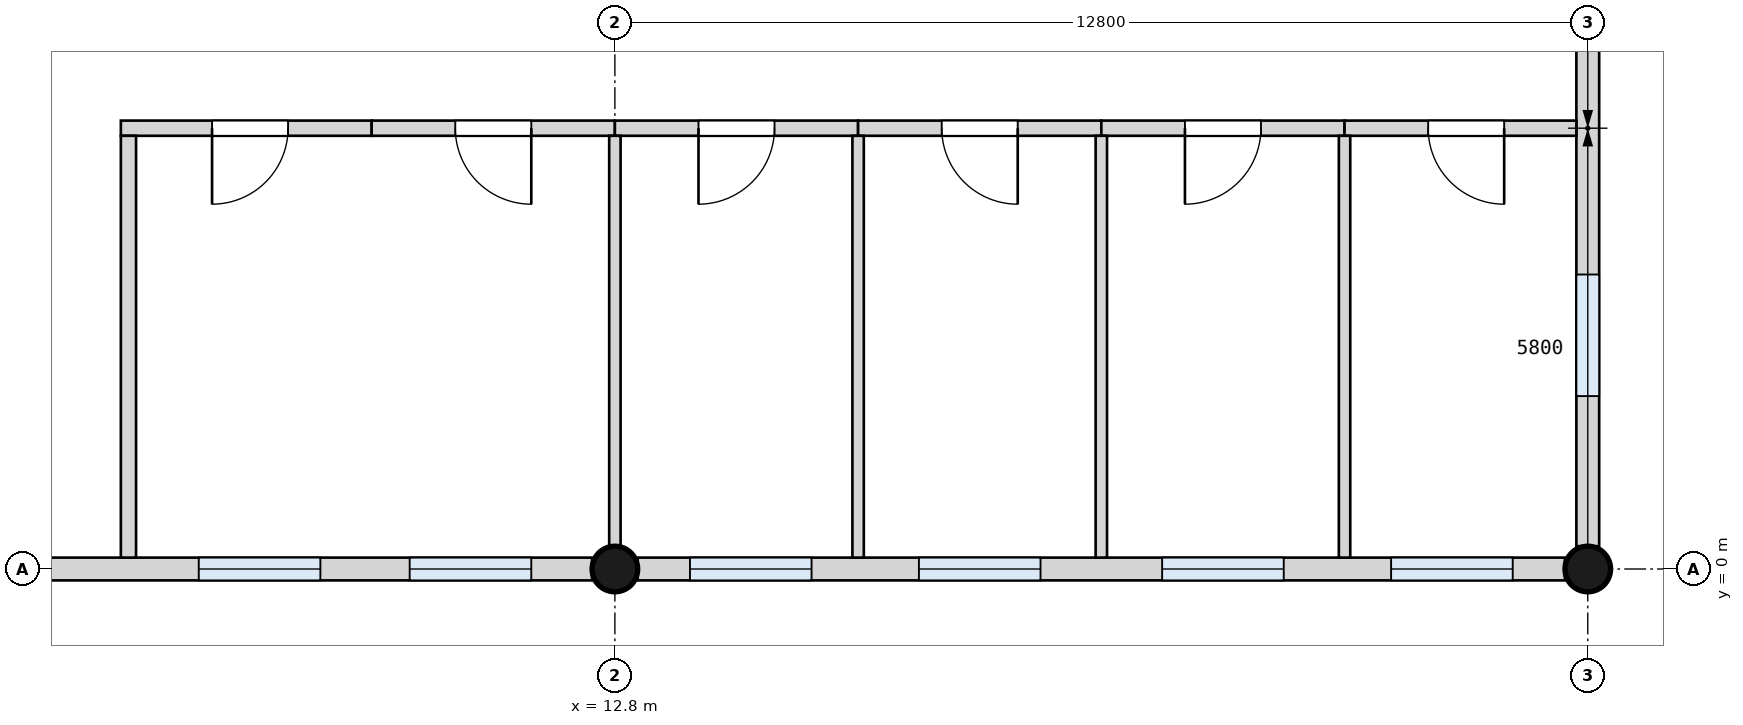
"""IFC4 building model, lengths in metres.
Left out: names, types, materials, properties, quantities, classifications, styles, units other than length and angle.
Written with IfcOpenShell. Run it as: python <this file> out.ifc"""

import sys

from ifc_helpers import new_model, si_unit, direction, frame, frame_2d, origin, origin_2d, place, context, subcontext, project, spatial, rectangle, circle, extrude, element, fill, save


model = new_model("IFC4")
c1 = context("Model", 3, precision=1e-05, world=origin(), true_north=direction((0.0, 1.0)))
c2 = subcontext(c1, "Body", "Model", "MODEL_VIEW")
j1 = project(units=[si_unit("LENGTHUNIT", "METRE"), si_unit("PLANEANGLEUNIT", "RADIAN")], contexts=[c1])
p1 = place(None, origin())
s1 = spatial("IfcSite", under=j1, at=p1, CompositionType="ELEMENT")
p2 = place(p1, origin())
s2 = spatial("IfcBuilding", under=s1, at=p2, CompositionType="ELEMENT")
p3 = place(p2, frame((0.0, 0.0, 4.2)))
s3 = spatial("IfcBuildingStorey", under=s2, at=p3, CompositionType="ELEMENT", Elevation=4.2)
for number, where, z_axis, x_axis in (
    (1, (12.8, 0.0, 0.0), (0.0, 0.0, 1.0), (1.0, 0.0, 0.0)),
    (2, (25.6, 0.0, 0.0), (0.0, 0.0, 1.0), (1.0, 0.0, 0.0)),
):
    element("IfcColumn", number, at=place(p3, frame(where, z_axis=z_axis, x_axis=x_axis)), inside=s3, PredefinedType="COLUMN", context=c2, shape_type="SweptSolid", body=[
        extrude(circle(Radius=0.3, at=origin_2d()), origin(), (0.0, 0.0, 1.0), 4.2),
    ])
p4 = place(p3, frame((4.6, 0.0, 0.0), z_axis=(0.0, 0.0, 1.0), x_axis=(1.0, 0.0, 0.0)))
e3 = element("IfcWall", 3, at=p4, inside=s3, PredefinedType="SOLIDWALL", context=c2, shape_type="SweptSolid", body=[
    extrude(rectangle(XDim=7.9, YDim=0.3, at=frame_2d((3.95, 0.0))), origin(), (0.0, 0.0, 1.0), 3.0),
])
p5 = place(p4, frame((2.725, 0.0, 1.0)))
e4 = element("IfcOpeningElement", 4, at=p5, cuts=e3, PredefinedType="OPENING", context=c2, shape_type="SweptSolid", body=[
    extrude(rectangle(XDim=1.6, YDim=1.8, at=frame_2d((0.8, 0.9))), frame((0.0, 0.16, 0.0), z_axis=(0.0, -1.0, 0.0), x_axis=(1.0, 0.0, 0.0)), (0.0, 0.0, 1.0), 0.32),
])
p6 = place(p4, frame((5.5, 0.0, 1.0)))
e5 = element("IfcOpeningElement", 5, at=p6, cuts=e3, PredefinedType="OPENING", context=c2, shape_type="SweptSolid", body=[
    extrude(rectangle(XDim=1.6, YDim=1.8, at=frame_2d((0.8, 0.9))), frame((0.0, 0.16, 0.0), z_axis=(0.0, -1.0, 0.0), x_axis=(1.0, 0.0, 0.0)), (0.0, 0.0, 1.0), 0.32),
])
p7 = place(p3, frame((13.1, 0.0, 0.0), z_axis=(0.0, 0.0, 1.0), x_axis=(1.0, 0.0, 0.0)))
e6 = element("IfcWall", 6, at=p7, inside=s3, PredefinedType="SOLIDWALL", context=c2, shape_type="SweptSolid", body=[
    extrude(rectangle(XDim=12.2, YDim=0.3, at=frame_2d((6.1, 0.0))), origin(), (0.0, 0.0, 1.0), 3.0),
])
p8 = place(p7, frame((0.688, 0.0, 1.0)))
e7 = element("IfcOpeningElement", 7, at=p8, cuts=e6, PredefinedType="OPENING", context=c2, shape_type="SweptSolid", body=[
    extrude(rectangle(XDim=1.6, YDim=1.8, at=frame_2d((0.8, 0.9))), frame((0.0, 0.16, 0.0), z_axis=(0.0, -1.0, 0.0), x_axis=(1.0, 0.0, 0.0)), (0.0, 0.0, 1.0), 0.32),
])
p9 = place(p7, frame((3.7, 0.0, 1.0)))
e8 = element("IfcOpeningElement", 8, at=p9, cuts=e6, PredefinedType="OPENING", context=c2, shape_type="SweptSolid", body=[
    extrude(rectangle(XDim=1.6, YDim=1.8, at=frame_2d((0.8, 0.9))), frame((0.0, 0.16, 0.0), z_axis=(0.0, -1.0, 0.0), x_axis=(1.0, 0.0, 0.0)), (0.0, 0.0, 1.0), 0.32),
])
p10 = place(p7, frame((6.9, 0.0, 1.0)))
e9 = element("IfcOpeningElement", 9, at=p10, cuts=e6, PredefinedType="OPENING", context=c2, shape_type="SweptSolid", body=[
    extrude(rectangle(XDim=1.6, YDim=1.8, at=frame_2d((0.8, 0.9))), frame((0.0, 0.16, 0.0), z_axis=(0.0, -1.0, 0.0), x_axis=(1.0, 0.0, 0.0)), (0.0, 0.0, 1.0), 0.32),
])
p11 = place(p7, frame((9.913, 0.0, 1.0)))
e10 = element("IfcOpeningElement", 10, at=p11, cuts=e6, PredefinedType="OPENING", context=c2, shape_type="SweptSolid", body=[
    extrude(rectangle(XDim=1.6, YDim=1.8, at=frame_2d((0.8, 0.9))), frame((0.0, 0.16, 0.0), z_axis=(0.0, -1.0, 0.0), x_axis=(1.0, 0.0, 0.0)), (0.0, 0.0, 1.0), 0.32),
])
p12 = place(p3, frame((25.6, 0.3, 0.0), z_axis=(0.0, 0.0, 1.0), x_axis=(0.0, 1.0, 0.0)))
e11 = element("IfcWall", 11, at=p12, inside=s3, PredefinedType="SOLIDWALL", context=c2, shape_type="SweptSolid", body=[
    extrude(rectangle(XDim=13.8, YDim=0.3, at=frame_2d((6.9, 0.0))), origin(), (0.0, 0.0, 1.0), 2.9),
])
p13 = place(p12, frame((1.975, 0.0, 1.0)))
e12 = element("IfcOpeningElement", 12, at=p13, cuts=e11, PredefinedType="OPENING", context=c2, shape_type="SweptSolid", body=[
    extrude(rectangle(XDim=1.6, YDim=1.8, at=frame_2d((0.8, 0.9))), frame((0.0, 0.16, 0.0), z_axis=(0.0, -1.0, 0.0), x_axis=(1.0, 0.0, 0.0)), (0.0, 0.0, 1.0), 0.32),
])
p14 = place(p12, frame((8.812, 0.0, 1.0)))
e13 = element("IfcOpeningElement", 13, at=p14, cuts=e11, PredefinedType="OPENING", context=c2, shape_type="SweptSolid", body=[
    extrude(rectangle(XDim=1.6, YDim=1.8, at=frame_2d((0.8, 0.9))), frame((0.0, 0.16, 0.0), z_axis=(0.0, -1.0, 0.0), x_axis=(1.0, 0.0, 0.0)), (0.0, 0.0, 1.0), 0.32),
])
p15 = place(p12, frame((11.712, 0.0, 1.0)))
e14 = element("IfcOpeningElement", 14, at=p15, cuts=e11, PredefinedType="OPENING", context=c2, shape_type="SweptSolid", body=[
    extrude(rectangle(XDim=1.6, YDim=1.8, at=frame_2d((0.8, 0.9))), frame((0.0, 0.16, 0.0), z_axis=(0.0, -1.0, 0.0), x_axis=(1.0, 0.0, 0.0)), (0.0, 0.0, 1.0), 0.32),
])
p16 = place(p3, frame((6.3, 5.8, 0.0), z_axis=(0.0, 0.0, 1.0), x_axis=(1.0, 0.0, 0.0)))
e15 = element("IfcWall", 15, at=p16, inside=s3, PredefinedType="PARTITIONING", context=c2, shape_type="SweptSolid", body=[
    extrude(rectangle(XDim=3.3, YDim=0.2, at=frame_2d((1.65, 0.0))), origin(), (0.0, 0.0, 1.0), 3.9),
])
p17 = place(p16, frame((1.2, 0.0, 0.0)))
e16 = element("IfcOpeningElement", 16, at=p17, cuts=e15, PredefinedType="OPENING", context=c2, shape_type="SweptSolid", body=[
    extrude(rectangle(XDim=1.0, YDim=2.1, at=frame_2d((0.5, 1.05))), frame((0.0, 0.11, 0.0), z_axis=(0.0, -1.0, 0.0), x_axis=(1.0, 0.0, 0.0)), (0.0, 0.0, 1.0), 0.22),
])
p18 = place(p3, frame((9.6, 5.8, 0.0), z_axis=(0.0, 0.0, 1.0), x_axis=(1.0, 0.0, 0.0)))
e17 = element("IfcWall", 17, at=p18, inside=s3, PredefinedType="PARTITIONING", context=c2, shape_type="SweptSolid", body=[
    extrude(rectangle(XDim=3.2, YDim=0.2, at=frame_2d((1.6, 0.0))), origin(), (0.0, 0.0, 1.0), 3.9),
])
p19 = place(p18, frame((1.1, 0.0, 0.0)))
e18 = element("IfcOpeningElement", 18, at=p19, cuts=e17, PredefinedType="OPENING", context=c2, shape_type="SweptSolid", body=[
    extrude(rectangle(XDim=1.0, YDim=2.1, at=frame_2d((0.5, 1.05))), frame((0.0, 0.11, 0.0), z_axis=(0.0, -1.0, 0.0), x_axis=(1.0, 0.0, 0.0)), (0.0, 0.0, 1.0), 0.22),
])
p20 = place(p3, frame((12.8, 5.8, 0.0), z_axis=(0.0, 0.0, 1.0), x_axis=(1.0, 0.0, 0.0)))
e19 = element("IfcWall", 19, at=p20, inside=s3, PredefinedType="PARTITIONING", context=c2, shape_type="SweptSolid", body=[
    extrude(rectangle(XDim=3.2, YDim=0.2, at=frame_2d((1.6, 0.0))), origin(), (0.0, 0.0, 1.0), 3.9),
])
p21 = place(p20, frame((1.1, 0.0, 0.0)))
e20 = element("IfcOpeningElement", 20, at=p21, cuts=e19, PredefinedType="OPENING", context=c2, shape_type="SweptSolid", body=[
    extrude(rectangle(XDim=1.0, YDim=2.1, at=frame_2d((0.5, 1.05))), frame((0.0, 0.11, 0.0), z_axis=(0.0, -1.0, 0.0), x_axis=(1.0, 0.0, 0.0)), (0.0, 0.0, 1.0), 0.22),
])
p22 = place(p3, frame((16.0, 5.8, 0.0), z_axis=(0.0, 0.0, 1.0), x_axis=(1.0, 0.0, 0.0)))
e21 = element("IfcWall", 21, at=p22, inside=s3, PredefinedType="PARTITIONING", context=c2, shape_type="SweptSolid", body=[
    extrude(rectangle(XDim=3.2, YDim=0.2, at=frame_2d((1.6, 0.0))), origin(), (0.0, 0.0, 1.0), 3.9),
])
p23 = place(p22, frame((1.1, 0.0, 0.0)))
e22 = element("IfcOpeningElement", 22, at=p23, cuts=e21, PredefinedType="OPENING", context=c2, shape_type="SweptSolid", body=[
    extrude(rectangle(XDim=1.0, YDim=2.1, at=frame_2d((0.5, 1.05))), frame((0.0, 0.11, 0.0), z_axis=(0.0, -1.0, 0.0), x_axis=(1.0, 0.0, 0.0)), (0.0, 0.0, 1.0), 0.22),
])
p24 = place(p3, frame((19.2, 5.8, 0.0), z_axis=(0.0, 0.0, 1.0), x_axis=(1.0, 0.0, 0.0)))
e23 = element("IfcWall", 23, at=p24, inside=s3, PredefinedType="PARTITIONING", context=c2, shape_type="SweptSolid", body=[
    extrude(rectangle(XDim=3.2, YDim=0.2, at=frame_2d((1.6, 0.0))), origin(), (0.0, 0.0, 1.0), 3.9),
])
p25 = place(p24, frame((1.1, 0.0, 0.0)))
e24 = element("IfcOpeningElement", 24, at=p25, cuts=e23, PredefinedType="OPENING", context=c2, shape_type="SweptSolid", body=[
    extrude(rectangle(XDim=1.0, YDim=2.1, at=frame_2d((0.5, 1.05))), frame((0.0, 0.11, 0.0), z_axis=(0.0, -1.0, 0.0), x_axis=(1.0, 0.0, 0.0)), (0.0, 0.0, 1.0), 0.22),
])
p26 = place(p3, frame((22.4, 5.8, 0.0), z_axis=(0.0, 0.0, 1.0), x_axis=(1.0, 0.0, 0.0)))
e25 = element("IfcWall", 25, at=p26, inside=s3, PredefinedType="PARTITIONING", context=c2, shape_type="SweptSolid", body=[
    extrude(rectangle(XDim=3.05, YDim=0.2, at=frame_2d((1.525, 0.0))), origin(), (0.0, 0.0, 1.0), 3.9),
])
p27 = place(p26, frame((1.1, 0.0, 0.0)))
e26 = element("IfcOpeningElement", 26, at=p27, cuts=e25, PredefinedType="OPENING", context=c2, shape_type="SweptSolid", body=[
    extrude(rectangle(XDim=1.0, YDim=2.1, at=frame_2d((0.5, 1.05))), frame((0.0, 0.11, 0.0), z_axis=(0.0, -1.0, 0.0), x_axis=(1.0, 0.0, 0.0)), (0.0, 0.0, 1.0), 0.22),
])
p28 = place(p3, frame((6.4, 0.15, 0.0), z_axis=(0.0, 0.0, 1.0), x_axis=(0.0, 1.0, 0.0)))
e27 = element("IfcWall", 27, at=p28, inside=s3, PredefinedType="PARTITIONING", context=c2, shape_type="SweptSolid", body=[
    extrude(rectangle(XDim=5.55, YDim=0.2, at=frame_2d((2.775, 0.0))), origin(), (0.0, 0.0, 1.0), 2.9),
])
p29 = place(p3, frame((12.8, 0.27, 0.0), z_axis=(0.0, 0.0, 1.0), x_axis=(0.0, 1.0, 0.0)))
e28 = element("IfcWall", 28, at=p29, inside=s3, PredefinedType="PARTITIONING", context=c2, shape_type="SweptSolid", body=[
    extrude(rectangle(XDim=5.43, YDim=0.15, at=frame_2d((2.715, 0.0))), origin(), (0.0, 0.0, 1.0), 2.9),
])
p30 = place(p3, frame((16.0, 0.15, 0.0), z_axis=(0.0, 0.0, 1.0), x_axis=(0.0, 1.0, 0.0)))
e29 = element("IfcWall", 29, at=p30, inside=s3, PredefinedType="PARTITIONING", context=c2, shape_type="SweptSolid", body=[
    extrude(rectangle(XDim=5.55, YDim=0.15, at=frame_2d((2.775, 0.0))), origin(), (0.0, 0.0, 1.0), 3.0),
])
p31 = place(p3, frame((19.2, 0.15, 0.0), z_axis=(0.0, 0.0, 1.0), x_axis=(0.0, 1.0, 0.0)))
e30 = element("IfcWall", 30, at=p31, inside=s3, PredefinedType="PARTITIONING", context=c2, shape_type="SweptSolid", body=[
    extrude(rectangle(XDim=5.55, YDim=0.15, at=frame_2d((2.775, 0.0))), origin(), (0.0, 0.0, 1.0), 2.9),
])
p32 = place(p3, frame((22.4, 0.15, 0.0), z_axis=(0.0, 0.0, 1.0), x_axis=(0.0, 1.0, 0.0)))
e31 = element("IfcWall", 31, at=p32, inside=s3, PredefinedType="PARTITIONING", context=c2, shape_type="SweptSolid", body=[
    extrude(rectangle(XDim=5.55, YDim=0.15, at=frame_2d((2.775, 0.0))), origin(), (0.0, 0.0, 1.0), 3.0),
])
p33 = place(p17, frame((1.0, 0.0, 0.0), z_axis=(0.0, 0.0, 1.0), x_axis=(-1.0, 0.0, 0.0)))
e32 = element("IfcDoor", 32, at=p33, inside=s3, OperationType="SINGLE_SWING_RIGHT", PredefinedType="DOOR", context=c2, shape_type="SweptSolid", body=[
    extrude(rectangle(XDim=1.0, YDim=2.1, at=frame_2d((0.5, 1.05))), frame((0.0, 0.025, 0.0), z_axis=(0.0, -1.0, 0.0), x_axis=(1.0, 0.0, 0.0)), (0.0, 0.0, 1.0), 0.05),
])
fill(e16, e32)
p34 = place(p19, frame((1.0, 0.0, 0.0), z_axis=(0.0, 0.0, 1.0), x_axis=(-1.0, 0.0, 0.0)))
e33 = element("IfcDoor", 33, at=p34, inside=s3, OperationType="SINGLE_SWING_LEFT", PredefinedType="DOOR", context=c2, shape_type="SweptSolid", body=[
    extrude(rectangle(XDim=1.0, YDim=2.1, at=frame_2d((0.5, 1.05))), frame((0.0, 0.025, 0.0), z_axis=(0.0, -1.0, 0.0), x_axis=(1.0, 0.0, 0.0)), (0.0, 0.0, 1.0), 0.05),
])
fill(e18, e33)
p35 = place(p21, frame((1.0, 0.0, 0.0), z_axis=(0.0, 0.0, 1.0), x_axis=(-1.0, 0.0, 0.0)))
e34 = element("IfcDoor", 34, at=p35, inside=s3, OperationType="SINGLE_SWING_RIGHT", PredefinedType="DOOR", context=c2, shape_type="SweptSolid", body=[
    extrude(rectangle(XDim=1.0, YDim=2.1, at=frame_2d((0.5, 1.05))), frame((0.0, 0.025, 0.0), z_axis=(0.0, -1.0, 0.0), x_axis=(1.0, 0.0, 0.0)), (0.0, 0.0, 1.0), 0.05),
])
fill(e20, e34)
p36 = place(p23, frame((1.0, 0.0, 0.0), z_axis=(0.0, 0.0, 1.0), x_axis=(-1.0, 0.0, 0.0)))
e35 = element("IfcDoor", 35, at=p36, inside=s3, OperationType="SINGLE_SWING_LEFT", PredefinedType="DOOR", context=c2, shape_type="SweptSolid", body=[
    extrude(rectangle(XDim=1.0, YDim=2.1, at=frame_2d((0.5, 1.05))), frame((0.0, 0.025, 0.0), z_axis=(0.0, -1.0, 0.0), x_axis=(1.0, 0.0, 0.0)), (0.0, 0.0, 1.0), 0.05),
])
fill(e22, e35)
p37 = place(p25, frame((1.0, 0.0, 0.0), z_axis=(0.0, 0.0, 1.0), x_axis=(-1.0, 0.0, 0.0)))
e36 = element("IfcDoor", 36, at=p37, inside=s3, OperationType="SINGLE_SWING_RIGHT", PredefinedType="DOOR", context=c2, shape_type="SweptSolid", body=[
    extrude(rectangle(XDim=1.0, YDim=2.1, at=frame_2d((0.5, 1.05))), frame((0.0, 0.025, 0.0), z_axis=(0.0, -1.0, 0.0), x_axis=(1.0, 0.0, 0.0)), (0.0, 0.0, 1.0), 0.05),
])
fill(e24, e36)
p38 = place(p27, frame((1.0, 0.0, 0.0), z_axis=(0.0, 0.0, 1.0), x_axis=(-1.0, 0.0, 0.0)))
e37 = element("IfcDoor", 37, at=p38, inside=s3, OperationType="SINGLE_SWING_LEFT", PredefinedType="DOOR", context=c2, shape_type="SweptSolid", body=[
    extrude(rectangle(XDim=1.0, YDim=2.1, at=frame_2d((0.5, 1.05))), frame((0.0, 0.025, 0.0), z_axis=(0.0, -1.0, 0.0), x_axis=(1.0, 0.0, 0.0)), (0.0, 0.0, 1.0), 0.05),
])
fill(e26, e37)
p39 = place(p5, origin())
e38 = element("IfcWindow", 38, at=p39, inside=s3, PartitioningType="SINGLE_PANEL", PredefinedType="WINDOW", context=c2, shape_type="SweptSolid", body=[
    extrude(rectangle(XDim=1.6, YDim=1.8, at=frame_2d((0.8, 0.9))), frame((0.0, 0.03, 0.0), z_axis=(0.0, -1.0, 0.0), x_axis=(1.0, 0.0, 0.0)), (0.0, 0.0, 1.0), 0.06),
])
fill(e4, e38)
p40 = place(p6, origin())
e39 = element("IfcWindow", 39, at=p40, inside=s3, PartitioningType="SINGLE_PANEL", PredefinedType="WINDOW", context=c2, shape_type="SweptSolid", body=[
    extrude(rectangle(XDim=1.6, YDim=1.8, at=frame_2d((0.8, 0.9))), frame((0.0, 0.03, 0.0), z_axis=(0.0, -1.0, 0.0), x_axis=(1.0, 0.0, 0.0)), (0.0, 0.0, 1.0), 0.06),
])
fill(e5, e39)
p41 = place(p8, origin())
e40 = element("IfcWindow", 40, at=p41, inside=s3, PartitioningType="SINGLE_PANEL", PredefinedType="WINDOW", context=c2, shape_type="SweptSolid", body=[
    extrude(rectangle(XDim=1.6, YDim=1.8, at=frame_2d((0.8, 0.9))), frame((0.0, 0.03, 0.0), z_axis=(0.0, -1.0, 0.0), x_axis=(1.0, 0.0, 0.0)), (0.0, 0.0, 1.0), 0.06),
])
fill(e7, e40)
p42 = place(p9, origin())
e41 = element("IfcWindow", 41, at=p42, inside=s3, PartitioningType="SINGLE_PANEL", PredefinedType="WINDOW", context=c2, shape_type="SweptSolid", body=[
    extrude(rectangle(XDim=1.6, YDim=1.8, at=frame_2d((0.8, 0.9))), frame((0.0, 0.03, 0.0), z_axis=(0.0, -1.0, 0.0), x_axis=(1.0, 0.0, 0.0)), (0.0, 0.0, 1.0), 0.06),
])
fill(e8, e41)
p43 = place(p10, origin())
e42 = element("IfcWindow", 42, at=p43, inside=s3, PartitioningType="SINGLE_PANEL", PredefinedType="WINDOW", context=c2, shape_type="SweptSolid", body=[
    extrude(rectangle(XDim=1.6, YDim=1.8, at=frame_2d((0.8, 0.9))), frame((0.0, 0.03, 0.0), z_axis=(0.0, -1.0, 0.0), x_axis=(1.0, 0.0, 0.0)), (0.0, 0.0, 1.0), 0.06),
])
fill(e9, e42)
p44 = place(p11, origin())
e43 = element("IfcWindow", 43, at=p44, inside=s3, PartitioningType="SINGLE_PANEL", PredefinedType="WINDOW", context=c2, shape_type="SweptSolid", body=[
    extrude(rectangle(XDim=1.6, YDim=1.8, at=frame_2d((0.8, 0.9))), frame((0.0, 0.03, 0.0), z_axis=(0.0, -1.0, 0.0), x_axis=(1.0, 0.0, 0.0)), (0.0, 0.0, 1.0), 0.06),
])
fill(e10, e43)
p45 = place(p13, origin())
e44 = element("IfcWindow", 44, at=p45, inside=s3, PartitioningType="SINGLE_PANEL", PredefinedType="WINDOW", context=c2, shape_type="SweptSolid", body=[
    extrude(rectangle(XDim=1.6, YDim=1.8, at=frame_2d((0.8, 0.9))), frame((0.0, 0.03, 0.0), z_axis=(0.0, -1.0, 0.0), x_axis=(1.0, 0.0, 0.0)), (0.0, 0.0, 1.0), 0.06),
])
fill(e12, e44)
save(model, sys.argv[1])
